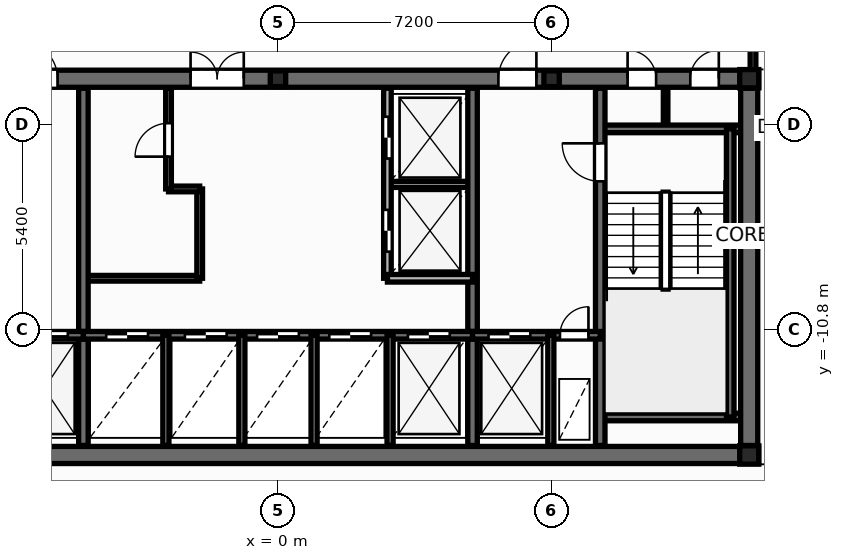
"""IFC4 building model, lengths in metres.
Left out: names, types, materials, properties, quantities, classifications, styles, units other than length and angle.
Written with IfcOpenShell. Run it as: python <this file> out.ifc"""

import sys

from ifc_helpers import new_model, si_unit, direction, frame, frame_2d, origin, origin_2d, place, context, subcontext, project, spatial, rectangle, i_section, extrude, element, fill, save


model = new_model("IFC4")
c1 = context("Model", 3, precision=1e-05, world=origin(), true_north=direction((0.0, 1.0)))
c2 = subcontext(c1, "Body", "Model", "MODEL_VIEW")
j1 = project(units=[si_unit("LENGTHUNIT", "METRE"), si_unit("PLANEANGLEUNIT", "RADIAN")], contexts=[c1])
p1 = place(None, origin())
s1 = spatial("IfcSite", under=j1, at=p1, CompositionType="ELEMENT")
p2 = place(p1, origin())
s2 = spatial("IfcBuilding", under=s1, at=p2, CompositionType="ELEMENT")
p3 = place(p2, frame((0.0, 0.0, 114.0)))
s3 = spatial("IfcBuildingStorey", under=s2, at=p3, CompositionType="ELEMENT", Elevation=114.0)
for number, where, z_axis, x_axis in (
    (1, (12.4, -14.1, 0.0), (0.0, 0.0, 1.0), (1.0, 0.0, 0.0)),
    (2, (12.4, -4.2, 0.0), (0.0, 0.0, 1.0), (1.0, 0.0, 0.0)),
):
    element("IfcColumn", number, at=place(p3, frame(where, z_axis=z_axis, x_axis=x_axis)), inside=s3, PredefinedType="COLUMN", context=c2, shape_type="SweptSolid", body=[
        extrude(i_section(OverallWidth=0.5, OverallDepth=0.482, WebThickness=0.04, FlangeThickness=0.045, at=origin_2d()), origin(), (0.0, 0.0, 1.0), 3.6),
    ])
for number, where, z_axis, x_axis in (
    (3, (0.0, -4.2, 0.0), (0.0, 0.0, 1.0), (1.0, 0.0, 0.0)),
    (4, (7.2, -4.2, 0.0), (0.0, 0.0, 1.0), (1.0, 0.0, 0.0)),
):
    element("IfcColumn", number, at=place(p3, frame(where, z_axis=z_axis, x_axis=x_axis)), inside=s3, PredefinedType="PILASTER", context=c2, shape_type="SweptSolid", body=[
        extrude(i_section(OverallWidth=0.405, OverallDepth=0.414, WebThickness=0.022, FlangeThickness=0.032, at=origin_2d()), origin(), (0.0, 0.0, 1.0), 3.6),
    ])
p4 = place(p3, frame((-5.12, -9.45, 0.0), z_axis=(0.0, 0.0, 1.0), x_axis=(1.0, 0.0, 0.0)))
e5 = element("IfcWall", 5, at=p4, inside=s3, PredefinedType="PARTITIONING", context=c2, shape_type="SweptSolid", body=[
    extrude(rectangle(XDim=3.06, YDim=0.15, at=frame_2d((1.53, 0.0))), origin(), (0.0, 0.0, 1.0), 3.32),
])
p5 = place(p3, frame((-2.06, -9.45, 0.0), z_axis=(0.0, 0.0, 1.0), x_axis=(0.0, 1.0, 0.0)))
e6 = element("IfcWall", 6, at=p5, inside=s3, PredefinedType="PARTITIONING", context=c2, shape_type="SweptSolid", body=[
    extrude(rectangle(XDim=2.35, YDim=0.15, at=frame_2d((1.175, 0.0))), origin(), (0.0, 0.0, 1.0), 3.32),
])
p6 = place(p3, frame((-2.88, -7.1, 0.0), z_axis=(0.0, 0.0, 1.0), x_axis=(1.0, 0.0, 0.0)))
e7 = element("IfcWall", 7, at=p6, inside=s3, PredefinedType="PARTITIONING", context=c2, shape_type="SweptSolid", body=[
    extrude(rectangle(XDim=0.82, YDim=0.15, at=frame_2d((0.41, 0.0))), origin(), (0.0, 0.0, 1.0), 3.32),
])
p7 = place(p3, frame((-2.88, -7.1, 0.0), z_axis=(0.0, 0.0, 1.0), x_axis=(0.0, 1.0, 0.0)))
e8 = element("IfcWall", 8, at=p7, inside=s3, PredefinedType="PARTITIONING", context=c2, shape_type="SweptSolid", body=[
    extrude(rectangle(XDim=2.65, YDim=0.15, at=frame_2d((1.325, 0.0))), origin(), (0.0, 0.0, 1.0), 3.32),
])
p8 = place(p7, frame((0.85, 0.0, 0.0)))
e9 = element("IfcOpeningElement", 9, at=p8, cuts=e8, PredefinedType="OPENING", context=c2, shape_type="SweptSolid", body=[
    extrude(rectangle(XDim=0.886, YDim=2.104, at=frame_2d((0.44, 1.052))), frame((0.0, 0.085, 0.0), z_axis=(0.0, -1.0, 0.0), x_axis=(1.0, 0.0, 0.0)), (0.0, 0.0, 1.0), 0.17),
])
p9 = place(p3, frame((2.88, -6.98, 0.0), z_axis=(0.0, 0.0, 1.0), x_axis=(1.0, 0.0, 0.0)))
e10 = element("IfcWall", 10, at=p9, inside=s3, PredefinedType="PARTITIONING", context=c2, shape_type="SweptSolid", body=[
    extrude(rectangle(XDim=2.24, YDim=0.16, at=frame_2d((1.12, 0.0))), origin(), (0.0, 0.0, 1.0), 3.32),
])
p10 = place(p3, frame((10.2, -5.52, 0.0), z_axis=(0.0, 0.0, 1.0), x_axis=(0.0, 1.0, 0.0)))
e11 = element("IfcWall", 11, at=p10, inside=s3, PredefinedType="PARTITIONING", context=c2, shape_type="SweptSolid", body=[
    extrude(rectangle(XDim=1.12, YDim=0.12, at=frame_2d((0.56, 0.0))), origin(), (0.0, 0.0, 1.0), 3.32),
])
p11 = place(p3, frame((-12.65, -14.1, 0.0), z_axis=(0.0, 0.0, 1.0), x_axis=(1.0, 0.0, 0.0)))
e12 = element("IfcWall", 12, at=p11, inside=s3, PredefinedType="SHEAR", context=c2, shape_type="SweptSolid", body=[
    extrude(rectangle(XDim=25.3, YDim=0.45, at=frame_2d((12.65, 0.0))), origin(), (0.0, 0.0, 1.0), 3.6),
])
p12 = place(p3, frame((-12.65, -4.2, 0.0), z_axis=(0.0, 0.0, 1.0), x_axis=(1.0, 0.0, 0.0)))
e13 = element("IfcWall", 13, at=p12, inside=s3, PredefinedType="SHEAR", context=c2, shape_type="SweptSolid", body=[
    extrude(rectangle(XDim=25.3, YDim=0.45, at=frame_2d((12.65, 0.0))), origin(), (0.0, 0.0, 1.0), 3.6),
])
p13 = place(p12, frame((0.95, 0.0, 0.0)))
e14 = element("IfcOpeningElement", 14, at=p13, cuts=e13, PredefinedType="OPENING", context=c2, shape_type="SweptSolid", body=[
    extrude(rectangle(XDim=0.756, YDim=2.054, at=frame_2d((0.375, 1.027))), frame((0.0, 0.235, 0.0), z_axis=(0.0, -1.0, 0.0), x_axis=(1.0, 0.0, 0.0)), (0.0, 0.0, 1.0), 0.47),
])
p14 = place(p12, frame((2.6, 0.0, 0.0)))
e15 = element("IfcOpeningElement", 15, at=p14, cuts=e13, PredefinedType="OPENING", context=c2, shape_type="SweptSolid", body=[
    extrude(rectangle(XDim=0.756, YDim=2.054, at=frame_2d((0.375, 1.027))), frame((0.0, 0.235, 0.0), z_axis=(0.0, -1.0, 0.0), x_axis=(1.0, 0.0, 0.0)), (0.0, 0.0, 1.0), 0.47),
])
p15 = place(p12, frame((21.85, 0.0, 0.0)))
e16 = element("IfcOpeningElement", 16, at=p15, cuts=e13, PredefinedType="OPENING", context=c2, shape_type="SweptSolid", body=[
    extrude(rectangle(XDim=0.756, YDim=2.054, at=frame_2d((0.375, 1.027))), frame((0.0, 0.235, 0.0), z_axis=(0.0, -1.0, 0.0), x_axis=(1.0, 0.0, 0.0)), (0.0, 0.0, 1.0), 0.47),
])
p16 = place(p12, frame((23.5, 0.0, 0.0)))
e17 = element("IfcOpeningElement", 17, at=p16, cuts=e13, PredefinedType="OPENING", context=c2, shape_type="SweptSolid", body=[
    extrude(rectangle(XDim=0.756, YDim=2.054, at=frame_2d((0.375, 1.027))), frame((0.0, 0.235, 0.0), z_axis=(0.0, -1.0, 0.0), x_axis=(1.0, 0.0, 0.0)), (0.0, 0.0, 1.0), 0.47),
])
p17 = place(p12, frame((5.85, 0.0, 0.0)))
e18 = element("IfcOpeningElement", 18, at=p17, cuts=e13, PredefinedType="OPENING", context=c2, shape_type="SweptSolid", body=[
    extrude(rectangle(XDim=1.006, YDim=2.104, at=frame_2d((0.5, 1.052))), frame((0.0, 0.235, 0.0), z_axis=(0.0, -1.0, 0.0), x_axis=(1.0, 0.0, 0.0)), (0.0, 0.0, 1.0), 0.47),
])
p18 = place(p12, frame((10.35, 0.0, 0.0)))
e19 = element("IfcOpeningElement", 19, at=p18, cuts=e13, PredefinedType="OPENING", context=c2, shape_type="SweptSolid", body=[
    extrude(rectangle(XDim=1.406, YDim=2.154, at=frame_2d((0.7, 1.077))), frame((0.0, 0.235, 0.0), z_axis=(0.0, -1.0, 0.0), x_axis=(1.0, 0.0, 0.0)), (0.0, 0.0, 1.0), 0.47),
])
p19 = place(p12, frame((18.45, 0.0, 0.0)))
e20 = element("IfcOpeningElement", 20, at=p19, cuts=e13, PredefinedType="OPENING", context=c2, shape_type="SweptSolid", body=[
    extrude(rectangle(XDim=1.006, YDim=2.104, at=frame_2d((0.5, 1.052))), frame((0.0, 0.235, 0.0), z_axis=(0.0, -1.0, 0.0), x_axis=(1.0, 0.0, 0.0)), (0.0, 0.0, 1.0), 0.47),
])
for number, where, z_axis, x_axis in (
    (21, (8.48, -5.52, 0.0), (0.0, 0.0, 1.0), (1.0, 0.0, 0.0)),
    (22, (8.48, -13.1, 0.0), (0.0, 0.0, 1.0), (1.0, 0.0, 0.0)),
):
    element("IfcWall", number, at=place(p3, frame(where, z_axis=z_axis, x_axis=x_axis)), inside=s3, PredefinedType="SOLIDWALL", context=c2, shape_type="SweptSolid", body=[
        extrude(rectangle(XDim=3.87, YDim=0.2, at=frame_2d((1.935, 0.0))), origin(), (0.0, 0.0, 1.0), 3.6),
    ])
p20 = place(p3, frame((11.9, -13.1, 0.0), z_axis=(0.0, 0.0, 1.0), x_axis=(0.0, 1.0, 0.0)))
e23 = element("IfcWall", 23, at=p20, inside=s3, PredefinedType="SOLIDWALL", context=c2, shape_type="SweptSolid", body=[
    extrude(rectangle(XDim=7.58, YDim=0.2, at=frame_2d((3.79, 0.0))), origin(), (0.0, 0.0, 1.0), 3.6),
])
p21 = place(p3, frame((8.48, -13.85, 0.0), z_axis=(0.0, 0.0, 1.0), x_axis=(0.0, 1.0, 0.0)))
e24 = element("IfcWall", 24, at=p21, inside=s3, PredefinedType="SHEAR", context=c2, shape_type="SweptSolid", body=[
    extrude(rectangle(XDim=9.4, YDim=0.25, at=frame_2d((4.7, 0.0))), origin(), (0.0, 0.0, 1.0), 3.6),
])
p22 = place(p21, frame((6.95, 0.0, 0.0)))
e25 = element("IfcOpeningElement", 25, at=p22, cuts=e24, PredefinedType="OPENING", context=c2, shape_type="SweptSolid", body=[
    extrude(rectangle(XDim=1.006, YDim=2.104, at=frame_2d((0.5, 1.052))), frame((0.0, 0.135, 0.0), z_axis=(0.0, -1.0, 0.0), x_axis=(1.0, 0.0, 0.0)), (0.0, 0.0, 1.0), 0.27),
])
for number, where, z_axis, x_axis in (
    (26, (-5.12, -13.85, 0.0), (0.0, 0.0, 1.0), (0.0, 1.0, 0.0)),
    (27, (5.12, -13.85, 0.0), (0.0, 0.0, 1.0), (0.0, 1.0, 0.0)),
):
    element("IfcWall", number, at=place(p3, frame(where, z_axis=z_axis, x_axis=x_axis)), inside=s3, PredefinedType="SHEAR", context=c2, shape_type="SweptSolid", body=[
        extrude(rectangle(XDim=9.4, YDim=0.25, at=frame_2d((4.7, 0.0))), origin(), (0.0, 0.0, 1.0), 3.6),
    ])
p23 = place(p3, frame((-8.48, -10.95, 0.0), z_axis=(0.0, 0.0, 1.0), x_axis=(1.0, 0.0, 0.0)))
e28 = element("IfcWall", 28, at=p23, inside=s3, PredefinedType="SOLIDWALL", context=c2, shape_type="SweptSolid", body=[
    extrude(rectangle(XDim=3.36, YDim=0.2, at=frame_2d((1.68, 0.0))), origin(), (0.0, 0.0, 1.0), 3.6),
])
p24 = place(p23, frame((0.28, 0.0, 0.0)))
e29 = element("IfcOpeningElement", 29, at=p24, cuts=e28, PredefinedType="OPENING", context=c2, shape_type="SweptSolid", body=[
    extrude(rectangle(XDim=0.756, YDim=2.054, at=frame_2d((0.375, 1.027))), frame((0.0, 0.11, 0.0), z_axis=(0.0, -1.0, 0.0), x_axis=(1.0, 0.0, 0.0)), (0.0, 0.0, 1.0), 0.22),
])
p25 = place(p23, frame((1.85, 0.0, 0.0)))
e30 = element("IfcOpeningElement", 30, at=p25, cuts=e28, PredefinedType="OPENING", context=c2, shape_type="SweptSolid", body=[
    extrude(rectangle(XDim=1.106, YDim=2.104, at=frame_2d((0.55, 1.052))), frame((0.0, 0.11, 0.0), z_axis=(0.0, -1.0, 0.0), x_axis=(1.0, 0.0, 0.0)), (0.0, 0.0, 1.0), 0.22),
])
p26 = place(p3, frame((-5.12, -10.95, 0.0), z_axis=(0.0, 0.0, 1.0), x_axis=(1.0, 0.0, 0.0)))
e31 = element("IfcWall", 31, at=p26, inside=s3, PredefinedType="SOLIDWALL", context=c2, shape_type="SweptSolid", body=[
    extrude(rectangle(XDim=10.24, YDim=0.2, at=frame_2d((5.12, 0.0))), origin(), (0.0, 0.0, 1.0), 3.6),
])
p27 = place(p26, frame((0.6, 0.0, 0.0)))
e32 = element("IfcOpeningElement", 32, at=p27, cuts=e31, PredefinedType="OPENING", context=c2, shape_type="SweptSolid", body=[
    extrude(rectangle(XDim=1.106, YDim=2.104, at=frame_2d((0.55, 1.052))), frame((0.0, 0.11, 0.0), z_axis=(0.0, -1.0, 0.0), x_axis=(1.0, 0.0, 0.0)), (0.0, 0.0, 1.0), 0.22),
])
p28 = place(p26, frame((2.67, 0.0, 0.0)))
e33 = element("IfcOpeningElement", 33, at=p28, cuts=e31, PredefinedType="OPENING", context=c2, shape_type="SweptSolid", body=[
    extrude(rectangle(XDim=1.106, YDim=2.104, at=frame_2d((0.55, 1.052))), frame((0.0, 0.11, 0.0), z_axis=(0.0, -1.0, 0.0), x_axis=(1.0, 0.0, 0.0)), (0.0, 0.0, 1.0), 0.22),
])
p29 = place(p26, frame((4.57, 0.0, 0.0)))
e34 = element("IfcOpeningElement", 34, at=p29, cuts=e31, PredefinedType="OPENING", context=c2, shape_type="SweptSolid", body=[
    extrude(rectangle(XDim=1.106, YDim=2.104, at=frame_2d((0.55, 1.052))), frame((0.0, 0.11, 0.0), z_axis=(0.0, -1.0, 0.0), x_axis=(1.0, 0.0, 0.0)), (0.0, 0.0, 1.0), 0.22),
])
p30 = place(p26, frame((6.47, 0.0, 0.0)))
e35 = element("IfcOpeningElement", 35, at=p30, cuts=e31, PredefinedType="OPENING", context=c2, shape_type="SweptSolid", body=[
    extrude(rectangle(XDim=1.106, YDim=2.104, at=frame_2d((0.55, 1.052))), frame((0.0, 0.11, 0.0), z_axis=(0.0, -1.0, 0.0), x_axis=(1.0, 0.0, 0.0)), (0.0, 0.0, 1.0), 0.22),
])
p31 = place(p26, frame((8.54, 0.0, 0.0)))
e36 = element("IfcOpeningElement", 36, at=p31, cuts=e31, PredefinedType="OPENING", context=c2, shape_type="SweptSolid", body=[
    extrude(rectangle(XDim=1.106, YDim=2.104, at=frame_2d((0.55, 1.052))), frame((0.0, 0.11, 0.0), z_axis=(0.0, -1.0, 0.0), x_axis=(1.0, 0.0, 0.0)), (0.0, 0.0, 1.0), 0.22),
])
p32 = place(p3, frame((5.12, -10.95, 0.0), z_axis=(0.0, 0.0, 1.0), x_axis=(1.0, 0.0, 0.0)))
e37 = element("IfcWall", 37, at=p32, inside=s3, PredefinedType="SOLIDWALL", context=c2, shape_type="SweptSolid", body=[
    extrude(rectangle(XDim=3.36, YDim=0.2, at=frame_2d((1.68, 0.0))), origin(), (0.0, 0.0, 1.0), 3.6),
])
p33 = place(p32, frame((0.42, 0.0, 0.0)))
e38 = element("IfcOpeningElement", 38, at=p33, cuts=e37, PredefinedType="OPENING", context=c2, shape_type="SweptSolid", body=[
    extrude(rectangle(XDim=1.106, YDim=2.104, at=frame_2d((0.55, 1.052))), frame((0.0, 0.11, 0.0), z_axis=(0.0, -1.0, 0.0), x_axis=(1.0, 0.0, 0.0)), (0.0, 0.0, 1.0), 0.22),
])
p34 = place(p32, frame((2.3, 0.0, 0.0)))
e39 = element("IfcOpeningElement", 39, at=p34, cuts=e37, PredefinedType="OPENING", context=c2, shape_type="SweptSolid", body=[
    extrude(rectangle(XDim=0.756, YDim=2.054, at=frame_2d((0.375, 1.027))), frame((0.0, 0.11, 0.0), z_axis=(0.0, -1.0, 0.0), x_axis=(1.0, 0.0, 0.0)), (0.0, 0.0, 1.0), 0.22),
])
for number, where, z_axis, x_axis in (
    (40, (7.18, -13.85, 0.0), (0.0, 0.0, 1.0), (0.0, 1.0, 0.0)),
    (41, (-2.95, -13.85, 0.0), (0.0, 0.0, 1.0), (0.0, 1.0, 0.0)),
    (42, (2.95, -13.85, 0.0), (0.0, 0.0, 1.0), (0.0, 1.0, 0.0)),
):
    element("IfcWall", number, at=place(p3, frame(where, z_axis=z_axis, x_axis=x_axis)), inside=s3, PredefinedType="PARTITIONING", context=c2, shape_type="SweptSolid", body=[
        extrude(rectangle(XDim=2.9, YDim=0.16, at=frame_2d((1.45, 0.0))), origin(), (0.0, 0.0, 1.0), 2.345),
    ])
p35 = place(p3, frame((12.4, -13.85, 0.0), z_axis=(0.0, 0.0, 1.0), x_axis=(0.0, 1.0, 0.0)))
e43 = element("IfcWall", 43, at=p35, inside=s3, PredefinedType="SHEAR", context=c2, shape_type="SweptSolid", body=[
    extrude(rectangle(XDim=9.4, YDim=0.45, at=frame_2d((4.7, 0.0))), origin(), (0.0, 0.0, 1.0), 3.6),
])
p36 = place(p3, frame((2.88, -9.45, 0.0), z_axis=(0.0, 0.0, 1.0), x_axis=(0.0, 1.0, 0.0)))
e44 = element("IfcWall", 44, at=p36, inside=s3, PredefinedType="SOLIDWALL", context=c2, shape_type="SweptSolid", body=[
    extrude(rectangle(XDim=5.0, YDim=0.2, at=frame_2d((2.5, 0.0))), origin(), (0.0, 0.0, 1.0), 3.32),
])
p37 = place(p36, frame((0.7, 0.0, 0.0)))
e45 = element("IfcOpeningElement", 45, at=p37, cuts=e44, PredefinedType="OPENING", context=c2, shape_type="SweptSolid", body=[
    extrude(rectangle(XDim=1.106, YDim=2.104, at=frame_2d((0.55, 1.052))), frame((0.0, 0.11, 0.0), z_axis=(0.0, -1.0, 0.0), x_axis=(1.0, 0.0, 0.0)), (0.0, 0.0, 1.0), 0.22),
])
p38 = place(p36, frame((3.15, 0.0, 0.0)))
e46 = element("IfcOpeningElement", 46, at=p38, cuts=e44, PredefinedType="OPENING", context=c2, shape_type="SweptSolid", body=[
    extrude(rectangle(XDim=1.106, YDim=2.104, at=frame_2d((0.55, 1.052))), frame((0.0, 0.11, 0.0), z_axis=(0.0, -1.0, 0.0), x_axis=(1.0, 0.0, 0.0)), (0.0, 0.0, 1.0), 0.22),
])
p39 = place(p3, frame((2.88, -9.45, 0.0), z_axis=(0.0, 0.0, 1.0), x_axis=(1.0, 0.0, 0.0)))
e47 = element("IfcWall", 47, at=p39, inside=s3, PredefinedType="SOLIDWALL", context=c2, shape_type="SweptSolid", body=[
    extrude(rectangle(XDim=2.24, YDim=0.2, at=frame_2d((1.12, 0.0))), origin(), (0.0, 0.0, 1.0), 3.32),
])
for number, where, z_axis, x_axis in (
    (48, (-0.95, -13.85, 0.0), (0.0, 0.0, 1.0), (0.0, 1.0, 0.0)),
    (49, (0.95, -13.85, 0.0), (0.0, 0.0, 1.0), (0.0, 1.0, 0.0)),
):
    element("IfcWall", number, at=place(p3, frame(where, z_axis=z_axis, x_axis=x_axis)), inside=s3, PredefinedType="PARTITIONING", context=c2, shape_type="SweptSolid", body=[
        extrude(rectangle(XDim=2.9, YDim=0.16, at=frame_2d((1.45, 0.0))), origin(), (0.0, 0.0, 1.0), 2.345),
    ])
p40 = place(p3, frame((12.5, -4.24, 0.0), z_axis=(0.0, 0.0, 1.0), x_axis=(0.0, 1.0, 0.0)))
e50 = element("IfcWall", 50, at=p40, inside=s3, PredefinedType="PARTITIONING", context=c2, shape_type="SweptSolid", body=[
    extrude(rectangle(XDim=1.48, YDim=0.15, at=frame_2d((0.74, 0.0))), origin(), (0.0, 0.0, 1.0), 2.295),
])
p41 = place(p8, origin())
e51 = element("IfcDoor", 51, at=p41, inside=s3, OperationType="SINGLE_SWING_LEFT", PredefinedType="DOOR", context=c2, shape_type="SweptSolid", body=[
    extrude(rectangle(XDim=0.88, YDim=2.1, at=frame_2d((0.44, 1.05))), frame((0.0, 0.025, 0.0), z_axis=(0.0, -1.0, 0.0), x_axis=(1.0, 0.0, 0.0)), (0.0, 0.0, 1.0), 0.05),
])
fill(e9, e51)
p42 = place(p37, origin())
e52 = element("IfcDoor", 52, at=p42, inside=s3, OperationType="DOUBLE_DOOR_SLIDING", PredefinedType="DOOR", context=c2, shape_type="SweptSolid", body=[
    extrude(rectangle(XDim=1.1, YDim=2.1, at=frame_2d((0.55, 1.05))), frame((0.0, 0.025, 0.0), z_axis=(0.0, -1.0, 0.0), x_axis=(1.0, 0.0, 0.0)), (0.0, 0.0, 1.0), 0.05),
])
fill(e45, e52)
p43 = place(p38, origin())
e53 = element("IfcDoor", 53, at=p43, inside=s3, OperationType="DOUBLE_DOOR_SLIDING", PredefinedType="DOOR", context=c2, shape_type="SweptSolid", body=[
    extrude(rectangle(XDim=1.1, YDim=2.1, at=frame_2d((0.55, 1.05))), frame((0.0, 0.025, 0.0), z_axis=(0.0, -1.0, 0.0), x_axis=(1.0, 0.0, 0.0)), (0.0, 0.0, 1.0), 0.05),
])
fill(e46, e53)
p44 = place(p22, origin())
e54 = element("IfcDoor", 54, at=p44, inside=s3, OperationType="SINGLE_SWING_RIGHT", PredefinedType="DOOR", context=c2, shape_type="SweptSolid", body=[
    extrude(rectangle(XDim=1.0, YDim=2.1, at=frame_2d((0.5, 1.05))), frame((0.0, 0.025, 0.0), z_axis=(0.0, -1.0, 0.0), x_axis=(1.0, 0.0, 0.0)), (0.0, 0.0, 1.0), 0.05),
])
fill(e25, e54)
p45 = place(p25, origin())
e55 = element("IfcDoor", 55, at=p45, inside=s3, OperationType="DOUBLE_DOOR_SLIDING", PredefinedType="DOOR", context=c2, shape_type="SweptSolid", body=[
    extrude(rectangle(XDim=1.1, YDim=2.1, at=frame_2d((0.55, 1.05))), frame((0.0, 0.025, 0.0), z_axis=(0.0, -1.0, 0.0), x_axis=(1.0, 0.0, 0.0)), (0.0, 0.0, 1.0), 0.05),
])
fill(e30, e55)
p46 = place(p33, origin())
e56 = element("IfcDoor", 56, at=p46, inside=s3, OperationType="DOUBLE_DOOR_SLIDING", PredefinedType="DOOR", context=c2, shape_type="SweptSolid", body=[
    extrude(rectangle(XDim=1.1, YDim=2.1, at=frame_2d((0.55, 1.05))), frame((0.0, 0.025, 0.0), z_axis=(0.0, -1.0, 0.0), x_axis=(1.0, 0.0, 0.0)), (0.0, 0.0, 1.0), 0.05),
])
fill(e38, e56)
p47 = place(p34, origin())
e57 = element("IfcDoor", 57, at=p47, inside=s3, OperationType="SINGLE_SWING_RIGHT", PredefinedType="DOOR", context=c2, shape_type="SweptSolid", body=[
    extrude(rectangle(XDim=0.75, YDim=2.05, at=frame_2d((0.375, 1.025))), frame((0.0, 0.025, 0.0), z_axis=(0.0, -1.0, 0.0), x_axis=(1.0, 0.0, 0.0)), (0.0, 0.0, 1.0), 0.05),
])
fill(e39, e57)
p48 = place(p27, origin())
e58 = element("IfcDoor", 58, at=p48, inside=s3, OperationType="DOUBLE_DOOR_SLIDING", PredefinedType="DOOR", context=c2, shape_type="SweptSolid", body=[
    extrude(rectangle(XDim=1.1, YDim=2.1, at=frame_2d((0.55, 1.05))), frame((0.0, 0.025, 0.0), z_axis=(0.0, -1.0, 0.0), x_axis=(1.0, 0.0, 0.0)), (0.0, 0.0, 1.0), 0.05),
])
fill(e32, e58)
p49 = place(p28, origin())
e59 = element("IfcDoor", 59, at=p49, inside=s3, OperationType="DOUBLE_DOOR_SLIDING", PredefinedType="DOOR", context=c2, shape_type="SweptSolid", body=[
    extrude(rectangle(XDim=1.1, YDim=2.1, at=frame_2d((0.55, 1.05))), frame((0.0, 0.025, 0.0), z_axis=(0.0, -1.0, 0.0), x_axis=(1.0, 0.0, 0.0)), (0.0, 0.0, 1.0), 0.05),
])
fill(e33, e59)
p50 = place(p29, origin())
e60 = element("IfcDoor", 60, at=p50, inside=s3, OperationType="DOUBLE_DOOR_SLIDING", PredefinedType="DOOR", context=c2, shape_type="SweptSolid", body=[
    extrude(rectangle(XDim=1.1, YDim=2.1, at=frame_2d((0.55, 1.05))), frame((0.0, 0.025, 0.0), z_axis=(0.0, -1.0, 0.0), x_axis=(1.0, 0.0, 0.0)), (0.0, 0.0, 1.0), 0.05),
])
fill(e34, e60)
p51 = place(p30, origin())
e61 = element("IfcDoor", 61, at=p51, inside=s3, OperationType="DOUBLE_DOOR_SLIDING", PredefinedType="DOOR", context=c2, shape_type="SweptSolid", body=[
    extrude(rectangle(XDim=1.1, YDim=2.1, at=frame_2d((0.55, 1.05))), frame((0.0, 0.025, 0.0), z_axis=(0.0, -1.0, 0.0), x_axis=(1.0, 0.0, 0.0)), (0.0, 0.0, 1.0), 0.05),
])
fill(e35, e61)
p52 = place(p31, origin())
e62 = element("IfcDoor", 62, at=p52, inside=s3, OperationType="DOUBLE_DOOR_SLIDING", PredefinedType="DOOR", context=c2, shape_type="SweptSolid", body=[
    extrude(rectangle(XDim=1.1, YDim=2.1, at=frame_2d((0.55, 1.05))), frame((0.0, 0.025, 0.0), z_axis=(0.0, -1.0, 0.0), x_axis=(1.0, 0.0, 0.0)), (0.0, 0.0, 1.0), 0.05),
])
fill(e36, e62)
p53 = place(p15, origin())
e63 = element("IfcDoor", 63, at=p53, inside=s3, OperationType="SINGLE_SWING_LEFT", PredefinedType="DOOR", context=c2, shape_type="SweptSolid", body=[
    extrude(rectangle(XDim=0.75, YDim=2.05, at=frame_2d((0.375, 1.025))), frame((0.0, 0.025, 0.0), z_axis=(0.0, -1.0, 0.0), x_axis=(1.0, 0.0, 0.0)), (0.0, 0.0, 1.0), 0.05),
])
fill(e16, e63)
p54 = place(p16, origin())
e64 = element("IfcDoor", 64, at=p54, inside=s3, OperationType="SINGLE_SWING_RIGHT", PredefinedType="DOOR", context=c2, shape_type="SweptSolid", body=[
    extrude(rectangle(XDim=0.75, YDim=2.05, at=frame_2d((0.375, 1.025))), frame((0.0, 0.025, 0.0), z_axis=(0.0, -1.0, 0.0), x_axis=(1.0, 0.0, 0.0)), (0.0, 0.0, 1.0), 0.05),
])
fill(e17, e64)
p55 = place(p17, origin())
e65 = element("IfcDoor", 65, at=p55, inside=s3, OperationType="SINGLE_SWING_LEFT", PredefinedType="DOOR", context=c2, shape_type="SweptSolid", body=[
    extrude(rectangle(XDim=1.0, YDim=2.1, at=frame_2d((0.5, 1.05))), frame((0.0, 0.025, 0.0), z_axis=(0.0, -1.0, 0.0), x_axis=(1.0, 0.0, 0.0)), (0.0, 0.0, 1.0), 0.05),
])
fill(e18, e65)
p56 = place(p18, origin())
e66 = element("IfcDoor", 66, at=p56, inside=s3, OperationType="DOUBLE_DOOR_SINGLE_SWING", PredefinedType="DOOR", context=c2, shape_type="SweptSolid", body=[
    extrude(rectangle(XDim=1.4, YDim=2.15, at=frame_2d((0.7, 1.075))), frame((0.0, 0.025, 0.0), z_axis=(0.0, -1.0, 0.0), x_axis=(1.0, 0.0, 0.0)), (0.0, 0.0, 1.0), 0.05),
])
fill(e19, e66)
p57 = place(p19, origin())
e67 = element("IfcDoor", 67, at=p57, inside=s3, OperationType="SINGLE_SWING_RIGHT", PredefinedType="DOOR", context=c2, shape_type="SweptSolid", body=[
    extrude(rectangle(XDim=1.0, YDim=2.1, at=frame_2d((0.5, 1.05))), frame((0.0, 0.025, 0.0), z_axis=(0.0, -1.0, 0.0), x_axis=(1.0, 0.0, 0.0)), (0.0, 0.0, 1.0), 0.05),
])
fill(e20, e67)
save(model, sys.argv[1])
